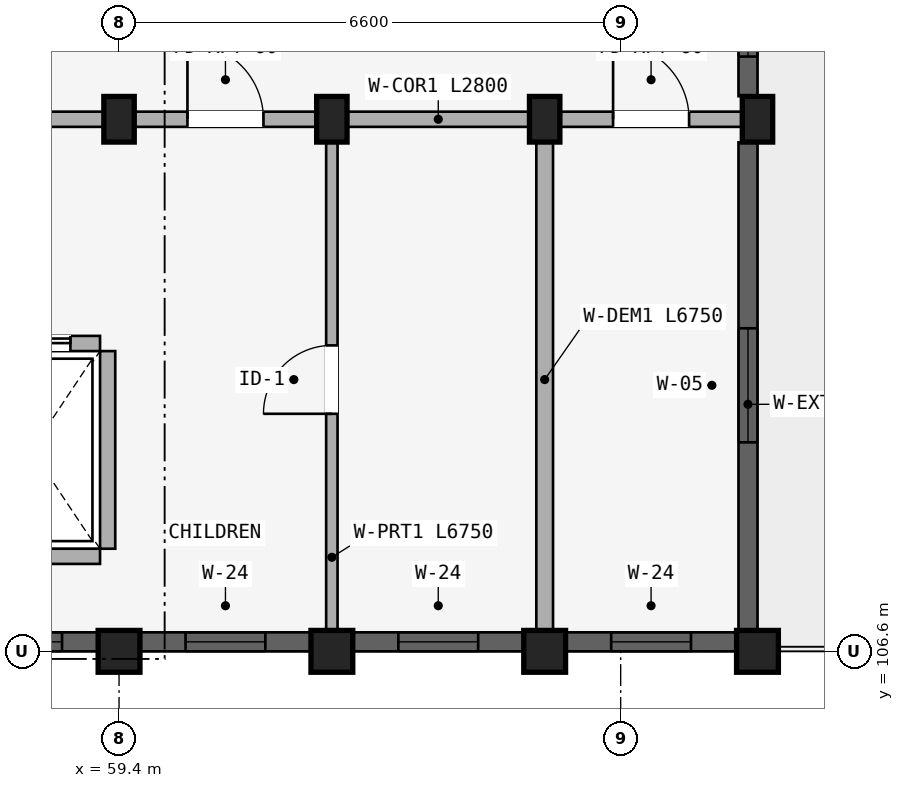
"""IFC4 building model, lengths in metres.
Left out: names, types, materials, properties, quantities, classifications, styles, units other than length and angle.
Written with IfcOpenShell. Run it as: python <this file> out.ifc"""

import sys

from ifc_helpers import new_model, si_unit, direction, frame, frame_2d, origin, origin_2d, place, context, subcontext, project, spatial, rectangle, extrude, element, fill, save


model = new_model("IFC4")
c1 = context("Model", 3, precision=1e-05, world=origin(), true_north=direction((0.0, 1.0)))
c2 = subcontext(c1, "Body", "Model", "MODEL_VIEW")
j1 = project(units=[si_unit("LENGTHUNIT", "METRE"), si_unit("PLANEANGLEUNIT", "RADIAN")], contexts=[c1])
p1 = place(None, origin())
s1 = spatial("IfcSite", under=j1, at=p1, CompositionType="ELEMENT")
p2 = place(p1, origin())
s2 = spatial("IfcBuilding", under=s1, at=p2, CompositionType="ELEMENT")
p3 = place(p2, frame((0.0, 0.0, 46.5)))
s3 = spatial("IfcBuildingStorey", under=s2, at=p3, CompositionType="ELEMENT", Elevation=46.5)
p4 = place(p3, frame((59.4, 106.6, 0.0), z_axis=(0.0, 0.0, 1.0), x_axis=(1.0, 0.0, 0.0)))
e1 = element("IfcColumn", 1, at=p4, inside=s3, PredefinedType="COLUMN", context=c2, shape_type="SweptSolid", body=[
    extrude(rectangle(XDim=0.55, YDim=0.55, at=origin_2d()), origin(), (0.0, 0.0, 1.0), 2.93),
])
p5 = place(p3, frame((59.4, 113.6, 0.0), z_axis=(0.0, 0.0, 1.0), x_axis=(1.0, 0.0, 0.0)))
e2 = element("IfcColumn", 2, at=p5, inside=s3, PredefinedType="COLUMN", context=c2, shape_type="SweptSolid", body=[
    extrude(rectangle(XDim=0.4, YDim=0.6, at=origin_2d()), origin(), (0.0, 0.0, 1.0), 2.93),
])
p6 = place(p3, frame((62.2, 106.6, 0.0), z_axis=(0.0, 0.0, 1.0), x_axis=(1.0, 0.0, 0.0)))
e3 = element("IfcColumn", 3, at=p6, inside=s3, PredefinedType="COLUMN", context=c2, shape_type="SweptSolid", body=[
    extrude(rectangle(XDim=0.55, YDim=0.55, at=origin_2d()), origin(), (0.0, 0.0, 1.0), 2.93),
])
p7 = place(p3, frame((62.2, 113.6, 0.0), z_axis=(0.0, 0.0, 1.0), x_axis=(1.0, 0.0, 0.0)))
e4 = element("IfcColumn", 4, at=p7, inside=s3, PredefinedType="COLUMN", context=c2, shape_type="SweptSolid", body=[
    extrude(rectangle(XDim=0.4, YDim=0.6, at=origin_2d()), origin(), (0.0, 0.0, 1.0), 2.93),
])
p8 = place(p3, frame((65.0, 106.6, 0.0), z_axis=(0.0, 0.0, 1.0), x_axis=(1.0, 0.0, 0.0)))
e5 = element("IfcColumn", 5, at=p8, inside=s3, PredefinedType="COLUMN", context=c2, shape_type="SweptSolid", body=[
    extrude(rectangle(XDim=0.55, YDim=0.55, at=origin_2d()), origin(), (0.0, 0.0, 1.0), 2.93),
])
p9 = place(p3, frame((65.0, 113.6, 0.0), z_axis=(0.0, 0.0, 1.0), x_axis=(1.0, 0.0, 0.0)))
e6 = element("IfcColumn", 6, at=p9, inside=s3, PredefinedType="COLUMN", context=c2, shape_type="SweptSolid", body=[
    extrude(rectangle(XDim=0.4, YDim=0.6, at=origin_2d()), origin(), (0.0, 0.0, 1.0), 2.93),
])
p10 = place(p3, frame((67.8, 106.6, 0.0), z_axis=(0.0, 0.0, 1.0), x_axis=(1.0, 0.0, 0.0)))
e7 = element("IfcColumn", 7, at=p10, inside=s3, PredefinedType="COLUMN", context=c2, shape_type="SweptSolid", body=[
    extrude(rectangle(XDim=0.55, YDim=0.55, at=origin_2d()), origin(), (0.0, 0.0, 1.0), 2.93),
])
p11 = place(p3, frame((67.8, 113.6, 0.0), z_axis=(0.0, 0.0, 1.0), x_axis=(1.0, 0.0, 0.0)))
e8 = element("IfcColumn", 8, at=p11, inside=s3, PredefinedType="COLUMN", context=c2, shape_type="SweptSolid", body=[
    extrude(rectangle(XDim=0.4, YDim=0.6, at=origin_2d()), origin(), (0.0, 0.0, 1.0), 2.93),
])
p12 = place(p3, frame((59.25, 107.95, 0.0), z_axis=(0.0, 0.0, 1.0), x_axis=(0.0, 1.0, 0.0)))
e9 = element("IfcWall", 9, at=p12, inside=s3, PredefinedType="STANDARD", context=c2, shape_type="SweptSolid", body=[
    extrude(rectangle(XDim=2.6, YDim=0.2, at=frame_2d((1.3, 0.0))), origin(), (0.0, 0.0, 1.0), 2.372),
])
p13 = place(p3, frame((57.35, 107.85, 0.0), z_axis=(0.0, 0.0, 1.0), x_axis=(1.0, 0.0, 0.0)))
e10 = element("IfcWall", 10, at=p13, inside=s3, PredefinedType="STANDARD", context=c2, shape_type="SweptSolid", body=[
    extrude(rectangle(XDim=1.8, YDim=0.2, at=frame_2d((0.9, 0.0))), origin(), (0.0, 0.0, 1.0), 2.93),
])
p14 = place(p3, frame((57.35, 110.65, 0.0), z_axis=(0.0, 0.0, 1.0), x_axis=(1.0, 0.0, 0.0)))
e11 = element("IfcWall", 11, at=p14, inside=s3, PredefinedType="STANDARD", context=c2, shape_type="SweptSolid", body=[
    extrude(rectangle(XDim=1.8, YDim=0.2, at=frame_2d((0.9, 0.0))), origin(), (0.0, 0.0, 1.0), 2.93),
])
p15 = place(p14, frame((0.39, 0.0, 0.0)))
e12 = element("IfcOpeningElement", 12, at=p15, cuts=e11, PredefinedType="OPENING", context=c2, shape_type="SweptSolid", body=[
    extrude(rectangle(XDim=1.02, YDim=2.15, at=frame_2d((0.51, 1.075))), frame((0.0, 0.11, 0.0), z_axis=(0.0, -1.0, 0.0), x_axis=(1.0, 0.0, 0.0)), (0.0, 0.0, 1.0), 0.22),
])
p16 = place(p3, frame((53.75, 113.6, 0.0), z_axis=(0.0, 0.0, 1.0), x_axis=(1.0, 0.0, 0.0)))
e13 = element("IfcWall", 13, at=p16, inside=s3, PredefinedType="STANDARD", context=c2, shape_type="SweptSolid", body=[
    extrude(rectangle(XDim=5.6, YDim=0.2, at=frame_2d((2.8, 0.0))), origin(), (0.0, 0.0, 1.0), 2.372),
])
p17 = place(p16, frame((1.91, 0.0, 0.0)))
e14 = element("IfcOpeningElement", 14, at=p17, cuts=e13, PredefinedType="OPENING", context=c2, shape_type="SweptSolid", body=[
    extrude(rectangle(XDim=1.22, YDim=2.15, at=frame_2d((0.61, 1.075))), frame((0.0, 0.11, 0.0), z_axis=(0.0, -1.0, 0.0), x_axis=(1.0, 0.0, 0.0)), (0.0, 0.0, 1.0), 0.22),
])
p18 = place(p3, frame((59.4, 113.6, 0.0), z_axis=(0.0, 0.0, 1.0), x_axis=(1.0, 0.0, 0.0)))
e15 = element("IfcWall", 15, at=p18, inside=s3, PredefinedType="STANDARD", context=c2, shape_type="SweptSolid", body=[
    extrude(rectangle(XDim=2.8, YDim=0.2, at=frame_2d((1.4, 0.0))), origin(), (0.0, 0.0, 1.0), 2.372),
])
p19 = place(p18, frame((0.9, 0.0, 0.0)))
e16 = element("IfcOpeningElement", 16, at=p19, cuts=e15, PredefinedType="OPENING", context=c2, shape_type="SweptSolid", body=[
    extrude(rectangle(XDim=1.0, YDim=2.15, at=frame_2d((0.5, 1.075))), frame((0.0, 0.11, 0.0), z_axis=(0.0, -1.0, 0.0), x_axis=(1.0, 0.0, 0.0)), (0.0, 0.0, 1.0), 0.22),
])
p20 = place(p3, frame((62.2, 113.6, 0.0), z_axis=(0.0, 0.0, 1.0), x_axis=(1.0, 0.0, 0.0)))
e17 = element("IfcWall", 17, at=p20, inside=s3, PredefinedType="STANDARD", context=c2, shape_type="SweptSolid", body=[
    extrude(rectangle(XDim=2.8, YDim=0.2, at=frame_2d((1.4, 0.0))), origin(), (0.0, 0.0, 1.0), 2.372),
])
p21 = place(p3, frame((65.0, 113.6, 0.0), z_axis=(0.0, 0.0, 1.0), x_axis=(1.0, 0.0, 0.0)))
e18 = element("IfcWall", 18, at=p21, inside=s3, PredefinedType="STANDARD", context=c2, shape_type="SweptSolid", body=[
    extrude(rectangle(XDim=2.8, YDim=0.2, at=frame_2d((1.4, 0.0))), origin(), (0.0, 0.0, 1.0), 2.372),
])
p22 = place(p21, frame((0.9, 0.0, 0.0)))
e19 = element("IfcOpeningElement", 19, at=p22, cuts=e18, PredefinedType="OPENING", context=c2, shape_type="SweptSolid", body=[
    extrude(rectangle(XDim=1.0, YDim=2.15, at=frame_2d((0.5, 1.075))), frame((0.0, 0.11, 0.0), z_axis=(0.0, -1.0, 0.0), x_axis=(1.0, 0.0, 0.0)), (0.0, 0.0, 1.0), 0.22),
])
p23 = place(p3, frame((62.2, 106.8, 0.0), z_axis=(0.0, 0.0, 1.0), x_axis=(0.0, 1.0, 0.0)))
e20 = element("IfcWall", 20, at=p23, inside=s3, PredefinedType="PARTITIONING", context=c2, shape_type="SweptSolid", body=[
    extrude(rectangle(XDim=6.75, YDim=0.15, at=frame_2d((3.375, 0.0))), origin(), (0.0, 0.0, 1.0), 2.372),
])
p24 = place(p23, frame((2.925, 0.0, 0.0)))
e21 = element("IfcOpeningElement", 21, at=p24, cuts=e20, PredefinedType="OPENING", context=c2, shape_type="SweptSolid", body=[
    extrude(rectangle(XDim=0.9, YDim=2.1, at=frame_2d((0.45, 1.05))), frame((0.0, 0.085, 0.0), z_axis=(0.0, -1.0, 0.0), x_axis=(1.0, 0.0, 0.0)), (0.0, 0.0, 1.0), 0.17),
])
p25 = place(p3, frame((65.0, 106.8, 0.0), z_axis=(0.0, 0.0, 1.0), x_axis=(0.0, 1.0, 0.0)))
e22 = element("IfcWall", 22, at=p25, inside=s3, PredefinedType="STANDARD", context=c2, shape_type="SweptSolid", body=[
    extrude(rectangle(XDim=6.75, YDim=0.22, at=frame_2d((3.375, 0.0))), origin(), (0.0, 0.0, 1.0), 2.372),
])
p26 = place(p3, frame((56.628, 106.725, 0.0), z_axis=(0.0, 0.0, 1.0), x_axis=(1.0, 0.0, 0.0)))
e23 = element("IfcWall", 23, at=p26, inside=s3, PredefinedType="STANDARD", context=c2, shape_type="SweptSolid", body=[
    extrude(rectangle(XDim=2.493, YDim=0.25, at=frame_2d((1.247, 0.0))), origin(), (0.0, 0.0, 1.0), 2.472),
])
p27 = place(p26, frame((0.822, 0.0, 0.772)))
e24 = element("IfcOpeningElement", 24, at=p27, cuts=e23, PredefinedType="OPENING", context=c2, shape_type="SweptSolid", body=[
    extrude(rectangle(XDim=1.2, YDim=1.5, at=frame_2d((0.6, 0.75))), frame((0.0, 0.135, 0.0), z_axis=(0.0, -1.0, 0.0), x_axis=(1.0, 0.0, 0.0)), (0.0, 0.0, 1.0), 0.27),
])
p28 = place(p3, frame((59.678, 106.725, 0.0), z_axis=(0.0, 0.0, 1.0), x_axis=(1.0, 0.0, 0.0)))
e25 = element("IfcWall", 25, at=p28, inside=s3, PredefinedType="STANDARD", context=c2, shape_type="SweptSolid", body=[
    extrude(rectangle(XDim=2.243, YDim=0.25, at=frame_2d((1.122, 0.0))), origin(), (0.0, 0.0, 1.0), 2.472),
])
p29 = place(p28, frame((0.596, 0.0, 0.88)))
e26 = element("IfcOpeningElement", 26, at=p29, cuts=e25, PredefinedType="OPENING", context=c2, shape_type="SweptSolid", body=[
    extrude(rectangle(XDim=1.05, YDim=1.25, at=frame_2d((0.525, 0.625))), frame((0.0, 0.135, 0.0), z_axis=(0.0, -1.0, 0.0), x_axis=(1.0, 0.0, 0.0)), (0.0, 0.0, 1.0), 0.27),
])
p30 = place(p3, frame((62.479, 106.725, 0.0), z_axis=(0.0, 0.0, 1.0), x_axis=(1.0, 0.0, 0.0)))
e27 = element("IfcWall", 27, at=p30, inside=s3, PredefinedType="STANDARD", context=c2, shape_type="SweptSolid", body=[
    extrude(rectangle(XDim=2.243, YDim=0.25, at=frame_2d((1.122, 0.0))), origin(), (0.0, 0.0, 1.0), 2.472),
])
p31 = place(p30, frame((0.596, 0.0, 0.88)))
e28 = element("IfcOpeningElement", 28, at=p31, cuts=e27, PredefinedType="OPENING", context=c2, shape_type="SweptSolid", body=[
    extrude(rectangle(XDim=1.05, YDim=1.25, at=frame_2d((0.525, 0.625))), frame((0.0, 0.135, 0.0), z_axis=(0.0, -1.0, 0.0), x_axis=(1.0, 0.0, 0.0)), (0.0, 0.0, 1.0), 0.27),
])
p32 = place(p3, frame((65.279, 106.725, 0.0), z_axis=(0.0, 0.0, 1.0), x_axis=(1.0, 0.0, 0.0)))
e29 = element("IfcWall", 29, at=p32, inside=s3, PredefinedType="STANDARD", context=c2, shape_type="SweptSolid", body=[
    extrude(rectangle(XDim=2.243, YDim=0.25, at=frame_2d((1.122, 0.0))), origin(), (0.0, 0.0, 1.0), 2.472),
])
p33 = place(p32, frame((0.596, 0.0, 0.88)))
e30 = element("IfcOpeningElement", 30, at=p33, cuts=e29, PredefinedType="OPENING", context=c2, shape_type="SweptSolid", body=[
    extrude(rectangle(XDim=1.05, YDim=1.25, at=frame_2d((0.525, 0.625))), frame((0.0, 0.135, 0.0), z_axis=(0.0, -1.0, 0.0), x_axis=(1.0, 0.0, 0.0)), (0.0, 0.0, 1.0), 0.27),
])
p34 = place(p3, frame((67.675, 106.878, 0.0), z_axis=(0.0, 0.0, 1.0), x_axis=(0.0, 1.0, 0.0)))
e31 = element("IfcWall", 31, at=p34, inside=s3, PredefinedType="STANDARD", context=c2, shape_type="SweptSolid", body=[
    extrude(rectangle(XDim=6.418, YDim=0.25, at=frame_2d((3.209, 0.0))), origin(), (0.0, 0.0, 1.0), 2.372),
])
p35 = place(p34, frame((2.471, 0.0, 0.522)))
e32 = element("IfcOpeningElement", 32, at=p35, cuts=e31, PredefinedType="OPENING", context=c2, shape_type="SweptSolid", body=[
    extrude(rectangle(XDim=1.5, YDim=1.65, at=frame_2d((0.75, 0.825))), frame((0.0, 0.135, 0.0), z_axis=(0.0, -1.0, 0.0), x_axis=(1.0, 0.0, 0.0)), (0.0, 0.0, 1.0), 0.27),
])
p36 = place(p3, frame((67.675, 113.904, 0.0), z_axis=(0.0, 0.0, 1.0), x_axis=(0.0, 1.0, 0.0)))
e33 = element("IfcWall", 33, at=p36, inside=s3, PredefinedType="STANDARD", context=c2, shape_type="SweptSolid", body=[
    extrude(rectangle(XDim=1.793, YDim=0.25, at=frame_2d((0.896, 0.0))), origin(), (0.0, 0.0, 1.0), 2.372),
])
p37 = place(p36, frame((0.521, 0.0, 0.88)))
e34 = element("IfcOpeningElement", 34, at=p37, cuts=e33, PredefinedType="OPENING", context=c2, shape_type="SweptSolid", body=[
    extrude(rectangle(XDim=0.75, YDim=1.05, at=frame_2d((0.375, 0.525))), frame((0.0, 0.135, 0.0), z_axis=(0.0, -1.0, 0.0), x_axis=(1.0, 0.0, 0.0)), (0.0, 0.0, 1.0), 0.27),
])
p38 = place(p27, origin())
e35 = element("IfcWindow", 35, at=p38, inside=s3, PartitioningType="SINGLE_PANEL", PredefinedType="WINDOW", context=c2, shape_type="SweptSolid", body=[
    extrude(rectangle(XDim=1.2, YDim=1.5, at=frame_2d((0.6, 0.75))), frame((0.0, 0.03, 0.0), z_axis=(0.0, -1.0, 0.0), x_axis=(1.0, 0.0, 0.0)), (0.0, 0.0, 1.0), 0.06),
])
fill(e24, e35)
p39 = place(p29, origin())
e36 = element("IfcWindow", 36, at=p39, inside=s3, PartitioningType="SINGLE_PANEL", PredefinedType="WINDOW", context=c2, shape_type="SweptSolid", body=[
    extrude(rectangle(XDim=1.05, YDim=1.25, at=frame_2d((0.525, 0.625))), frame((0.0, 0.03, 0.0), z_axis=(0.0, -1.0, 0.0), x_axis=(1.0, 0.0, 0.0)), (0.0, 0.0, 1.0), 0.06),
])
fill(e26, e36)
p40 = place(p31, origin())
e37 = element("IfcWindow", 37, at=p40, inside=s3, PartitioningType="SINGLE_PANEL", PredefinedType="WINDOW", context=c2, shape_type="SweptSolid", body=[
    extrude(rectangle(XDim=1.05, YDim=1.25, at=frame_2d((0.525, 0.625))), frame((0.0, 0.03, 0.0), z_axis=(0.0, -1.0, 0.0), x_axis=(1.0, 0.0, 0.0)), (0.0, 0.0, 1.0), 0.06),
])
fill(e28, e37)
p41 = place(p33, origin())
e38 = element("IfcWindow", 38, at=p41, inside=s3, PartitioningType="SINGLE_PANEL", PredefinedType="WINDOW", context=c2, shape_type="SweptSolid", body=[
    extrude(rectangle(XDim=1.05, YDim=1.25, at=frame_2d((0.525, 0.625))), frame((0.0, 0.03, 0.0), z_axis=(0.0, -1.0, 0.0), x_axis=(1.0, 0.0, 0.0)), (0.0, 0.0, 1.0), 0.06),
])
fill(e30, e38)
p42 = place(p35, origin())
e39 = element("IfcWindow", 39, at=p42, inside=s3, PartitioningType="DOUBLE_PANEL_VERTICAL", PredefinedType="WINDOW", context=c2, shape_type="SweptSolid", body=[
    extrude(rectangle(XDim=1.5, YDim=1.65, at=frame_2d((0.75, 0.825))), frame((0.0, 0.03, 0.0), z_axis=(0.0, -1.0, 0.0), x_axis=(1.0, 0.0, 0.0)), (0.0, 0.0, 1.0), 0.06),
])
fill(e32, e39)
p43 = place(p37, origin())
e40 = element("IfcWindow", 40, at=p43, inside=s3, PartitioningType="SINGLE_PANEL", PredefinedType="WINDOW", context=c2, shape_type="SweptSolid", body=[
    extrude(rectangle(XDim=0.75, YDim=1.05, at=frame_2d((0.375, 0.525))), frame((0.0, 0.03, 0.0), z_axis=(0.0, -1.0, 0.0), x_axis=(1.0, 0.0, 0.0)), (0.0, 0.0, 1.0), 0.06),
])
fill(e34, e40)
p44 = place(p15, origin())
e41 = element("IfcDoor", 41, at=p44, inside=s3, OperationType="SLIDING_TO_RIGHT", PredefinedType="DOOR", context=c2, shape_type="SweptSolid", body=[
    extrude(rectangle(XDim=1.02, YDim=2.15, at=frame_2d((0.51, 1.075))), frame((0.0, 0.025, 0.0), z_axis=(0.0, -1.0, 0.0), x_axis=(1.0, 0.0, 0.0)), (0.0, 0.0, 1.0), 0.05),
])
fill(e12, e41)
p45 = place(p19, frame((1.0, 0.0, 0.0), z_axis=(0.0, 0.0, 1.0), x_axis=(-1.0, 0.0, 0.0)))
e42 = element("IfcDoor", 42, at=p45, inside=s3, OperationType="SINGLE_SWING_RIGHT", PredefinedType="DOOR", context=c2, shape_type="SweptSolid", body=[
    extrude(rectangle(XDim=1.0, YDim=2.15, at=frame_2d((0.5, 1.075))), frame((0.0, 0.025, 0.0), z_axis=(0.0, -1.0, 0.0), x_axis=(1.0, 0.0, 0.0)), (0.0, 0.0, 1.0), 0.05),
])
fill(e16, e42)
p46 = place(p22, frame((1.0, 0.0, 0.0), z_axis=(0.0, 0.0, 1.0), x_axis=(-1.0, 0.0, 0.0)))
e43 = element("IfcDoor", 43, at=p46, inside=s3, OperationType="SINGLE_SWING_RIGHT", PredefinedType="DOOR", context=c2, shape_type="SweptSolid", body=[
    extrude(rectangle(XDim=1.0, YDim=2.15, at=frame_2d((0.5, 1.075))), frame((0.0, 0.025, 0.0), z_axis=(0.0, -1.0, 0.0), x_axis=(1.0, 0.0, 0.0)), (0.0, 0.0, 1.0), 0.05),
])
fill(e19, e43)
p47 = place(p24, frame((0.9, 0.0, 0.0), z_axis=(0.0, 0.0, 1.0), x_axis=(-1.0, 0.0, 0.0)))
e44 = element("IfcDoor", 44, at=p47, inside=s3, OperationType="SINGLE_SWING_RIGHT", PredefinedType="DOOR", context=c2, shape_type="SweptSolid", body=[
    extrude(rectangle(XDim=0.9, YDim=2.1, at=frame_2d((0.45, 1.05))), frame((0.0, 0.025, 0.0), z_axis=(0.0, -1.0, 0.0), x_axis=(1.0, 0.0, 0.0)), (0.0, 0.0, 1.0), 0.05),
])
fill(e21, e44)
save(model, sys.argv[1])
